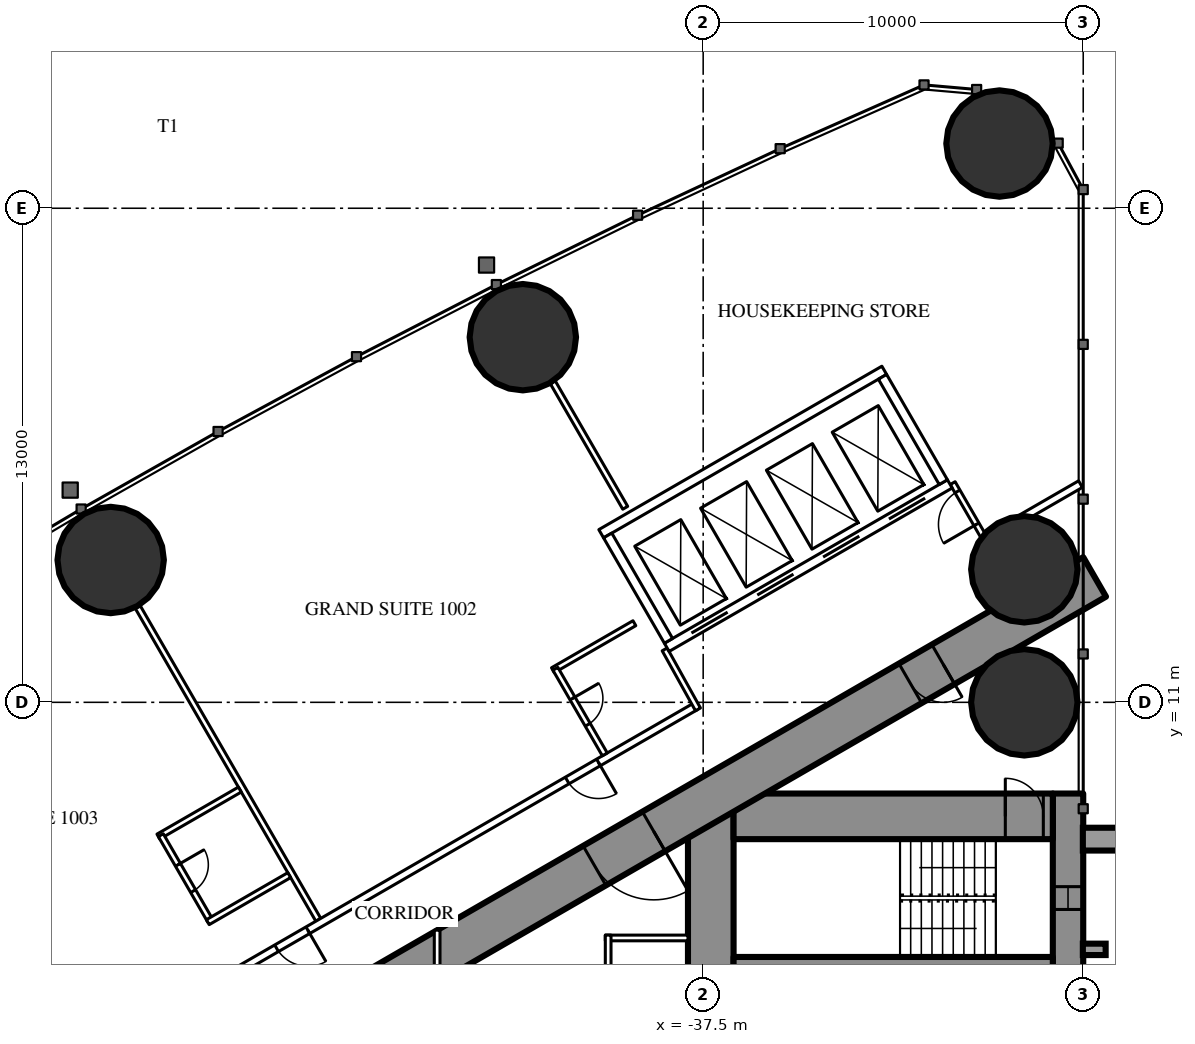
"""IFC4 building model, lengths in metres.
Left out: names, types, materials, properties, quantities, classifications, styles, units other than length and angle.
Written with IfcOpenShell. Run it as: python <this file> out.ifc"""

import sys

from ifc_helpers import new_model, si_unit, direction, frame, frame_2d, origin, origin_2d, place, context, subcontext, project, spatial, rectangle, hollow_circle, extrude, element, fill, save


model = new_model("IFC4")
c1 = context("Model", 3, precision=1e-05, world=origin(), true_north=direction((0.0, 1.0)))
c2 = subcontext(c1, "Body", "Model", "MODEL_VIEW")
j1 = project(units=[si_unit("LENGTHUNIT", "METRE"), si_unit("PLANEANGLEUNIT", "RADIAN")], contexts=[c1])
p1 = place(None, origin())
s1 = spatial("IfcSite", under=j1, at=p1, CompositionType="ELEMENT")
p2 = place(p1, origin())
s2 = spatial("IfcBuilding", under=s1, at=p2, CompositionType="ELEMENT")
p3 = place(p2, frame((0.0, 0.0, 42.5)))
s3 = spatial("IfcBuildingStorey", under=s2, at=p3, CompositionType="ELEMENT", Elevation=42.5)
for number, where, z_axis, x_axis in (
    (1, (-29.703, 25.703, 0.0), (0.0, 0.0, 1.0), (1.0, 0.0, 0.0)),
    (2, (-29.05, 11.0, 0.0), (0.0, 0.0, 1.0), (1.0, 0.0, 0.0)),
    (3, (-29.05, 14.5, 0.0), (0.0, 0.0, 1.0), (1.0, 0.0, 0.0)),
    (4, (-42.245, 20.607, 0.0), (0.0, 0.0, 1.0), (1.0, 0.0, 0.0)),
    (5, (-53.09, 14.745, 0.0), (0.0, 0.0, 1.0), (1.0, 0.0, 0.0)),
):
    element("IfcColumn", number, at=place(p3, frame(where, z_axis=z_axis, x_axis=x_axis)), inside=s3, PredefinedType="COLUMN", context=c2, shape_type="SweptSolid", body=[
        extrude(hollow_circle(Radius=1.4, WallThickness=0.12, at=origin_2d()), origin(), (0.0, 0.0, 1.0), 3.5),
    ])
p4 = place(p3, frame((-27.9, 8.6, 0.0), z_axis=(0.0, 0.0, 1.0), x_axis=(0.0, -1.0, 0.0)))
e6 = element("IfcWall", 6, at=p4, inside=s3, PredefinedType="SHEAR", context=c2, shape_type="SweptSolid", body=[
    extrude(rectangle(XDim=17.2, YDim=0.8, at=frame_2d((8.6, 0.0))), origin(), (0.0, 0.0, 1.0), 3.5),
])
p5 = place(p4, frame((2.45, 0.0, 0.6)))
e7 = element("IfcOpeningElement", 7, at=p5, cuts=e6, PredefinedType="OPENING", context=c2, shape_type="SweptSolid", body=[
    extrude(rectangle(XDim=0.6, YDim=2.1, at=frame_2d((0.3, 1.05))), frame((0.0, 0.41, 0.0), z_axis=(0.0, -1.0, 0.0), x_axis=(1.0, 0.0, 0.0)), (0.0, 0.0, 1.0), 0.82),
])
p6 = place(p4, frame((14.15, 0.0, 0.6)))
e8 = element("IfcOpeningElement", 8, at=p6, cuts=e6, PredefinedType="OPENING", context=c2, shape_type="SweptSolid", body=[
    extrude(rectangle(XDim=0.6, YDim=2.1, at=frame_2d((0.3, 1.05))), frame((0.0, 0.41, 0.0), z_axis=(0.0, -1.0, 0.0), x_axis=(1.0, 0.0, 0.0)), (0.0, 0.0, 1.0), 0.82),
])
p7 = place(p3, frame((-37.3, 8.6, 0.0), z_axis=(0.0, 0.0, 1.0), x_axis=(0.0, -1.0, 0.0)))
e9 = element("IfcWall", 9, at=p7, inside=s3, PredefinedType="SHEAR", context=c2, shape_type="SweptSolid", body=[
    extrude(rectangle(XDim=17.2, YDim=1.2, at=frame_2d((8.6, 0.0))), origin(), (0.0, 0.0, 1.0), 3.5),
])
p8 = place(p7, frame((7.7, 0.0, 0.0)))
e10 = element("IfcOpeningElement", 10, at=p8, cuts=e9, PredefinedType="OPENING", context=c2, shape_type="SweptSolid", body=[
    extrude(rectangle(XDim=1.8, YDim=2.2, at=frame_2d((0.9, 1.1))), frame((0.0, 0.61, 0.0), z_axis=(0.0, -1.0, 0.0), x_axis=(1.0, 0.0, 0.0)), (0.0, 0.0, 1.0), 1.22),
])
p9 = place(p3, frame((-28.3, 8.0, 0.0), z_axis=(0.0, 0.0, 1.0), x_axis=(-1.0, 0.0, 0.0)))
e11 = element("IfcWall", 11, at=p9, inside=s3, PredefinedType="SHEAR", context=c2, shape_type="SweptSolid", body=[
    extrude(rectangle(XDim=8.4, YDim=1.2, at=frame_2d((4.2, 0.0))), origin(), (0.0, 0.0, 1.0), 3.5),
])
p10 = place(p9, frame((0.25, 0.0, 0.0)))
e12 = element("IfcOpeningElement", 12, at=p10, cuts=e11, PredefinedType="OPENING", context=c2, shape_type="SweptSolid", body=[
    extrude(rectangle(XDim=1.0, YDim=2.2, at=frame_2d((0.5, 1.1))), frame((0.0, 0.61, 0.0), z_axis=(0.0, -1.0, 0.0), x_axis=(1.0, 0.0, 0.0)), (0.0, 0.0, 1.0), 1.22),
])
p11 = place(p3, frame((-28.3, 4.15, 0.0), z_axis=(0.0, 0.0, 1.0), x_axis=(-1.0, 0.0, 0.0)))
e13 = element("IfcWall", 13, at=p11, inside=s3, PredefinedType="SHEAR", context=c2, shape_type="SweptSolid", body=[
    extrude(rectangle(XDim=8.4, YDim=0.3, at=frame_2d((4.2, 0.0))), origin(), (0.0, 0.0, 1.0), 3.5),
])
p12 = place(p3, frame((-27.2, 14.3, 0.0), z_axis=(0.0, 0.0, 1.0), x_axis=(-0.866026593062, -0.499997940104, 0.0)))
e14 = element("IfcWall", 14, at=p12, inside=s3, PredefinedType="SHEAR", context=c2, shape_type="SweptSolid", body=[
    extrude(rectangle(XDim=28.946, YDim=1.2, at=frame_2d((14.473, 0.0))), origin(), (0.0, 0.0, 1.0), 3.5),
])
p13 = place(p12, frame((4.6, 0.0, 0.0)))
e15 = element("IfcOpeningElement", 15, at=p13, cuts=e14, PredefinedType="OPENING", context=c2, shape_type="SweptSolid", body=[
    extrude(rectangle(XDim=1.0, YDim=2.2, at=frame_2d((0.5, 1.1))), frame((0.0, 0.61, 0.0), z_axis=(0.0, -1.0, 0.0), x_axis=(1.0, 0.0, 0.0)), (0.0, 0.0, 1.0), 1.22),
])
p14 = place(p12, frame((13.395, 0.0, 0.0)))
e16 = element("IfcOpeningElement", 16, at=p14, cuts=e14, PredefinedType="OPENING", context=c2, shape_type="SweptSolid", body=[
    extrude(rectangle(XDim=1.8, YDim=2.2, at=frame_2d((0.9, 1.1))), frame((0.0, 0.61, 0.0), z_axis=(0.0, -1.0, 0.0), x_axis=(1.0, 0.0, 0.0)), (0.0, 0.0, 1.0), 1.22),
])
p15 = place(p3, frame((-47.627, 5.278, 0.0), z_axis=(0.0, 0.0, 1.0), x_axis=(-0.500009844318, 0.86601972009, 0.0)))
e17 = element("IfcWall", 17, at=p15, inside=s3, PredefinedType="PARTITIONING", context=c2, shape_type="SweptSolid", body=[
    extrude(rectangle(XDim=9.51, YDim=0.15, at=frame_2d((4.755, 0.0))), origin(), (0.0, 0.0, 1.0), 2.25),
])
p16 = place(p3, frame((-39.551, 16.119, 0.0), z_axis=(0.0, 0.0, 1.0), x_axis=(-0.500014214979, 0.866017196607, 0.0)))
e18 = element("IfcWall", 18, at=p16, inside=s3, PredefinedType="PARTITIONING", context=c2, shape_type="SweptSolid", body=[
    extrude(rectangle(XDim=3.815, YDim=0.15, at=frame_2d((1.907, 0.0))), origin(), (0.0, 0.0, 1.0), 3.25),
])
p17 = place(p3, frame((-27.572, 16.741, 0.0), z_axis=(0.0, 0.0, 1.0), x_axis=(-0.866034618596, -0.499984039138, 0.0)))
e19 = element("IfcWall", 19, at=p17, inside=s3, PredefinedType="PARTITIONING", context=c2, shape_type="SweptSolid", body=[
    extrude(rectangle(XDim=2.854, YDim=0.2, at=frame_2d((1.427, 0.0))), origin(), (0.0, 0.0, 1.0), 3.25),
])
p18 = place(p3, frame((-37.7, 10.894, 0.0), z_axis=(0.0, 0.0, 1.0), x_axis=(-0.866027905338, -0.499995667157, 0.0)))
e20 = element("IfcWall", 20, at=p18, inside=s3, PredefinedType="PARTITIONING", context=c2, shape_type="SweptSolid", body=[
    extrude(rectangle(XDim=21.787, YDim=0.2, at=frame_2d((10.894, 0.0))), origin(), (0.0, 0.0, 1.0), 3.25),
])
p19 = place(p18, frame((11.78, 0.0, 0.0)))
e21 = element("IfcOpeningElement", 21, at=p19, cuts=e20, PredefinedType="OPENING", context=c2, shape_type="SweptSolid", body=[
    extrude(rectangle(XDim=0.95, YDim=2.2, at=frame_2d((0.475, 1.1))), frame((0.0, 0.11, 0.0), z_axis=(0.0, -1.0, 0.0), x_axis=(1.0, 0.0, 0.0)), (0.0, 0.0, 1.0), 0.22),
])
p20 = place(p18, frame((2.95, 0.0, 0.0)))
e22 = element("IfcOpeningElement", 22, at=p20, cuts=e20, PredefinedType="OPENING", context=c2, shape_type="SweptSolid", body=[
    extrude(rectangle(XDim=0.95, YDim=2.2, at=frame_2d((0.475, 1.1))), frame((0.0, 0.11, 0.0), z_axis=(0.0, -1.0, 0.0), x_axis=(1.0, 0.0, 0.0)), (0.0, 0.0, 1.0), 0.22),
])
p21 = place(p3, frame((-38.513, 12.392, 0.0), z_axis=(0.0, 0.0, 1.0), x_axis=(0.485585508183, -0.874189175317, 0.0)))
e23 = element("IfcWall", 23, at=p21, inside=s3, PredefinedType="PARTITIONING", context=c2, shape_type="SweptSolid", body=[
    extrude(rectangle(XDim=1.805, YDim=0.15, at=frame_2d((0.902, 0.0))), origin(), (0.0, 0.0, 1.0), 3.25),
])
p22 = place(p3, frame((-30.033, 15.205, 0.0), z_axis=(0.0, 0.0, 1.0), x_axis=(-0.499980071345, 0.866036909293, 0.0)))
e24 = element("IfcWall", 24, at=p22, inside=s3, PredefinedType="PARTITIONING", context=c2, shape_type="SweptSolid", body=[
    extrude(rectangle(XDim=1.805, YDim=0.15, at=frame_2d((0.902, 0.0))), origin(), (0.0, 0.0, 1.0), 3.25),
])
p23 = place(p22, frame((0.552, 0.0, 0.0)))
e25 = element("IfcOpeningElement", 25, at=p23, cuts=e24, PredefinedType="OPENING", context=c2, shape_type="SweptSolid", body=[
    extrude(rectangle(XDim=1.0, YDim=2.2, at=frame_2d((0.5, 1.1))), frame((0.0, 0.085, 0.0), z_axis=(0.0, -1.0, 0.0), x_axis=(1.0, 0.0, 0.0)), (0.0, 0.0, 1.0), 0.17),
])
p24 = place(p3, frame((-49.692, 8.704, 0.0), z_axis=(0.0, 0.0, 1.0), x_axis=(-0.866073894602, -0.499916002032, 0.0)))
e26 = element("IfcWall", 26, at=p24, inside=s3, PredefinedType="PARTITIONING", context=c2, shape_type="SweptSolid", body=[
    extrude(rectangle(XDim=2.475, YDim=0.15, at=frame_2d((1.238, 0.0))), origin(), (0.0, 0.0, 1.0), 3.25),
])
p25 = place(p3, frame((-50.47, 5.253, 0.0), z_axis=(0.0, 0.0, 1.0), x_axis=(-0.500006934395, 0.866021400173, 0.0)))
e27 = element("IfcWall", 27, at=p25, inside=s3, PredefinedType="PARTITIONING", context=c2, shape_type="SweptSolid", body=[
    extrude(rectangle(XDim=2.6, YDim=0.15, at=frame_2d((1.3, 0.0))), origin(), (0.0, 0.0, 1.0), 3.25),
])
p26 = place(p25, frame((0.9, 0.0, 0.0)))
e28 = element("IfcOpeningElement", 28, at=p26, cuts=e27, PredefinedType="OPENING", context=c2, shape_type="SweptSolid", body=[
    extrude(rectangle(XDim=0.8, YDim=2.2, at=frame_2d((0.4, 1.1))), frame((0.0, 0.085, 0.0), z_axis=(0.0, -1.0, 0.0), x_axis=(1.0, 0.0, 0.0)), (0.0, 0.0, 1.0), 0.17),
])
p27 = place(p3, frame((-48.392, 6.453, 0.0), z_axis=(0.0, 0.0, 1.0), x_axis=(-0.86604923931, -0.499958713387, 0.0)))
e29 = element("IfcWall", 29, at=p27, inside=s3, PredefinedType="PARTITIONING", context=c2, shape_type="SweptSolid", body=[
    extrude(rectangle(XDim=2.475, YDim=0.15, at=frame_2d((1.237, 0.0))), origin(), (0.0, 0.0, 1.0), 3.25),
])
p28 = place(p3, frame((-39.31, 13.082, 0.0), z_axis=(0.0, 0.0, 1.0), x_axis=(-0.866031185235, -0.4999899861, 0.0)))
e30 = element("IfcWall", 30, at=p28, inside=s3, PredefinedType="PARTITIONING", context=c2, shape_type="SweptSolid", body=[
    extrude(rectangle(XDim=2.475, YDim=0.15, at=frame_2d((1.238, 0.0))), origin(), (0.0, 0.0, 1.0), 3.25),
])
p29 = place(p3, frame((-40.088, 9.63, 0.0), z_axis=(0.0, 0.0, 1.0), x_axis=(-0.500006934395, 0.866021400173, 0.0)))
e31 = element("IfcWall", 31, at=p29, inside=s3, PredefinedType="PARTITIONING", context=c2, shape_type="SweptSolid", body=[
    extrude(rectangle(XDim=2.6, YDim=0.15, at=frame_2d((1.3, 0.0))), origin(), (0.0, 0.0, 1.0), 3.25),
])
p30 = place(p29, frame((0.9, 0.0, 0.0)))
e32 = element("IfcOpeningElement", 32, at=p30, cuts=e31, PredefinedType="OPENING", context=c2, shape_type="SweptSolid", body=[
    extrude(rectangle(XDim=0.8, YDim=2.2, at=frame_2d((0.4, 1.1))), frame((0.0, 0.085, 0.0), z_axis=(0.0, -1.0, 0.0), x_axis=(1.0, 0.0, 0.0)), (0.0, 0.0, 1.0), 0.17),
])
p31 = place(p3, frame((-37.9, 4.8, 0.0), z_axis=(0.0, 0.0, 1.0), x_axis=(-1.0, 0.0, 0.0)))
e33 = element("IfcWall", 33, at=p31, inside=s3, PredefinedType="PARTITIONING", context=c2, shape_type="SweptSolid", body=[
    extrude(rectangle(XDim=2.175, YDim=0.15, at=frame_2d((1.087, 0.0))), origin(), (0.0, 0.0, 1.0), 3.25),
])
p32 = place(p3, frame((-40.0, 4.875, 0.0), z_axis=(0.0, 0.0, 1.0), x_axis=(0.0, -1.0, 0.0)))
e34 = element("IfcWall", 34, at=p32, inside=s3, PredefinedType="PARTITIONING", context=c2, shape_type="SweptSolid", body=[
    extrude(rectangle(XDim=3.75, YDim=0.15, at=frame_2d((1.875, 0.0))), origin(), (0.0, 0.0, 1.0), 3.25),
])
p33 = place(p32, frame((1.375, 0.0, 0.0)))
e35 = element("IfcOpeningElement", 35, at=p33, cuts=e34, PredefinedType="OPENING", context=c2, shape_type="SweptSolid", body=[
    extrude(rectangle(XDim=1.0, YDim=2.2, at=frame_2d((0.5, 1.1))), frame((0.0, 0.085, 0.0), z_axis=(0.0, -1.0, 0.0), x_axis=(1.0, 0.0, 0.0)), (0.0, 0.0, 1.0), 0.17),
])
p34 = place(p3, frame((-44.5, 5.005, 0.0), z_axis=(0.0, 0.0, 1.0), x_axis=(0.0, -1.0, 0.0)))
e36 = element("IfcWall", 36, at=p34, inside=s3, PredefinedType="PARTITIONING", context=c2, shape_type="SweptSolid", body=[
    extrude(rectangle(XDim=10.009, YDim=0.15, at=frame_2d((5.005, 0.0))), origin(), (0.0, 0.0, 1.0), 2.45),
])
p35 = place(p34, frame((4.505, 0.0, 0.0)))
e37 = element("IfcOpeningElement", 37, at=p35, cuts=e36, PredefinedType="OPENING", context=c2, shape_type="SweptSolid", body=[
    extrude(rectangle(XDim=1.0, YDim=2.2, at=frame_2d((0.5, 1.1))), frame((0.0, 0.085, 0.0), z_axis=(0.0, -1.0, 0.0), x_axis=(1.0, 0.0, 0.0)), (0.0, 0.0, 1.0), 0.17),
])
p36 = place(p3, frame((-31.01, 16.747, 0.0), z_axis=(0.0, 0.0, 1.0), x_axis=(-0.866028165386, -0.499995216735, 0.0)))
e38 = element("IfcWall", 38, at=p36, inside=s3, PredefinedType="PARTITIONING", context=c2, shape_type="SweptSolid", body=[
    extrude(rectangle(XDim=8.6, YDim=0.25, at=frame_2d((4.3, 0.0))), origin(), (0.0, 0.0, 1.0), 3.25),
])
p37 = place(p36, frame((0.75, 0.0, 0.0)))
e39 = element("IfcOpeningElement", 39, at=p37, cuts=e38, PredefinedType="OPENING", context=c2, shape_type="SweptSolid", body=[
    extrude(rectangle(XDim=1.1, YDim=2.2, at=frame_2d((0.55, 1.1))), frame((0.0, 0.135, 0.0), z_axis=(0.0, -1.0, 0.0), x_axis=(1.0, 0.0, 0.0)), (0.0, 0.0, 1.0), 0.27),
])
p38 = place(p36, frame((2.75, 0.0, 0.0)))
e40 = element("IfcOpeningElement", 40, at=p38, cuts=e38, PredefinedType="OPENING", context=c2, shape_type="SweptSolid", body=[
    extrude(rectangle(XDim=1.1, YDim=2.2, at=frame_2d((0.55, 1.1))), frame((0.0, 0.135, 0.0), z_axis=(0.0, -1.0, 0.0), x_axis=(1.0, 0.0, 0.0)), (0.0, 0.0, 1.0), 0.27),
])
p39 = place(p36, frame((4.75, 0.0, 0.0)))
e41 = element("IfcOpeningElement", 41, at=p39, cuts=e38, PredefinedType="OPENING", context=c2, shape_type="SweptSolid", body=[
    extrude(rectangle(XDim=1.1, YDim=2.2, at=frame_2d((0.55, 1.1))), frame((0.0, 0.135, 0.0), z_axis=(0.0, -1.0, 0.0), x_axis=(1.0, 0.0, 0.0)), (0.0, 0.0, 1.0), 0.27),
])
p40 = place(p36, frame((6.75, 0.0, 0.0)))
e42 = element("IfcOpeningElement", 42, at=p40, cuts=e38, PredefinedType="OPENING", context=c2, shape_type="SweptSolid", body=[
    extrude(rectangle(XDim=1.1, YDim=2.2, at=frame_2d((0.55, 1.1))), frame((0.0, 0.135, 0.0), z_axis=(0.0, -1.0, 0.0), x_axis=(1.0, 0.0, 0.0)), (0.0, 0.0, 1.0), 0.27),
])
p41 = place(p3, frame((-32.736, 19.736, 0.0), z_axis=(0.0, 0.0, 1.0), x_axis=(-0.866028165386, -0.499995216735, 0.0)))
e43 = element("IfcWall", 43, at=p41, inside=s3, PredefinedType="PARTITIONING", context=c2, shape_type="SweptSolid", body=[
    extrude(rectangle(XDim=8.6, YDim=0.25, at=frame_2d((4.3, 0.0))), origin(), (0.0, 0.0, 1.0), 3.25),
])
p42 = place(p3, frame((-31.181, 16.793, 0.0), z_axis=(0.0, 0.0, 1.0), x_axis=(-0.499929347863, 0.866066190972, 0.0)))
e44 = element("IfcWall", 44, at=p42, inside=s3, PredefinedType="PARTITIONING", context=c2, shape_type="SweptSolid", body=[
    extrude(rectangle(XDim=3.201, YDim=0.25, at=frame_2d((1.6, 0.0))), origin(), (0.0, 0.0, 1.0), 3.25),
])
p43 = place(p3, frame((-38.413, 12.618, 0.0), z_axis=(0.0, 0.0, 1.0), x_axis=(-0.499872130319, 0.866099216793, 0.0)))
e45 = element("IfcWall", 45, at=p43, inside=s3, PredefinedType="PARTITIONING", context=c2, shape_type="SweptSolid", body=[
    extrude(rectangle(XDim=3.2, YDim=0.25, at=frame_2d((1.6, 0.0))), origin(), (0.0, 0.0, 1.0), 3.25),
])
p44 = place(p26, origin())
e46 = element("IfcDoor", 46, at=p44, inside=s3, OperationType="SINGLE_SWING_RIGHT", PredefinedType="DOOR", context=c2, shape_type="SweptSolid", body=[
    extrude(rectangle(XDim=0.8, YDim=2.2, at=frame_2d((0.4, 1.1))), frame((0.0, 0.025, 0.0), z_axis=(0.0, -1.0, 0.0), x_axis=(1.0, 0.0, 0.0)), (0.0, 0.0, 1.0), 0.05),
])
fill(e28, e46)
p45 = place(p19, origin())
e47 = element("IfcDoor", 47, at=p45, inside=s3, OperationType="SINGLE_SWING_LEFT", PredefinedType="DOOR", context=c2, shape_type="SweptSolid", body=[
    extrude(rectangle(XDim=0.95, YDim=2.2, at=frame_2d((0.475, 1.1))), frame((0.0, 0.025, 0.0), z_axis=(0.0, -1.0, 0.0), x_axis=(1.0, 0.0, 0.0)), (0.0, 0.0, 1.0), 0.05),
])
fill(e21, e47)
p46 = place(p30, origin())
e48 = element("IfcDoor", 48, at=p46, inside=s3, OperationType="SINGLE_SWING_RIGHT", PredefinedType="DOOR", context=c2, shape_type="SweptSolid", body=[
    extrude(rectangle(XDim=0.8, YDim=2.2, at=frame_2d((0.4, 1.1))), frame((0.0, 0.025, 0.0), z_axis=(0.0, -1.0, 0.0), x_axis=(1.0, 0.0, 0.0)), (0.0, 0.0, 1.0), 0.05),
])
fill(e32, e48)
p47 = place(p20, origin())
e49 = element("IfcDoor", 49, at=p47, inside=s3, OperationType="SINGLE_SWING_LEFT", PredefinedType="DOOR", context=c2, shape_type="SweptSolid", body=[
    extrude(rectangle(XDim=0.95, YDim=2.2, at=frame_2d((0.475, 1.1))), frame((0.0, 0.025, 0.0), z_axis=(0.0, -1.0, 0.0), x_axis=(1.0, 0.0, 0.0)), (0.0, 0.0, 1.0), 0.05),
])
fill(e22, e49)
p48 = place(p23, origin())
e50 = element("IfcDoor", 50, at=p48, inside=s3, OperationType="SINGLE_SWING_LEFT", PredefinedType="DOOR", context=c2, shape_type="SweptSolid", body=[
    extrude(rectangle(XDim=1.0, YDim=2.2, at=frame_2d((0.5, 1.1))), frame((0.0, 0.025, 0.0), z_axis=(0.0, -1.0, 0.0), x_axis=(1.0, 0.0, 0.0)), (0.0, 0.0, 1.0), 0.05),
])
fill(e25, e50)
p49 = place(p13, origin())
e51 = element("IfcDoor", 51, at=p49, inside=s3, OperationType="SINGLE_SWING_LEFT", PredefinedType="DOOR", context=c2, shape_type="SweptSolid", body=[
    extrude(rectangle(XDim=1.0, YDim=2.2, at=frame_2d((0.5, 1.1))), frame((0.0, 0.025, 0.0), z_axis=(0.0, -1.0, 0.0), x_axis=(1.0, 0.0, 0.0)), (0.0, 0.0, 1.0), 0.05),
])
fill(e15, e51)
p50 = place(p14, origin())
e52 = element("IfcDoor", 52, at=p50, inside=s3, OperationType="DOUBLE_DOOR_SINGLE_SWING", PredefinedType="DOOR", context=c2, shape_type="SweptSolid", body=[
    extrude(rectangle(XDim=1.8, YDim=2.2, at=frame_2d((0.9, 1.1))), frame((0.0, 0.025, 0.0), z_axis=(0.0, -1.0, 0.0), x_axis=(1.0, 0.0, 0.0)), (0.0, 0.0, 1.0), 0.05),
])
fill(e16, e52)
p51 = place(p10, origin())
e53 = element("IfcDoor", 53, at=p51, inside=s3, OperationType="SINGLE_SWING_RIGHT", PredefinedType="DOOR", context=c2, shape_type="SweptSolid", body=[
    extrude(rectangle(XDim=1.0, YDim=2.2, at=frame_2d((0.5, 1.1))), frame((0.0, 0.025, 0.0), z_axis=(0.0, -1.0, 0.0), x_axis=(1.0, 0.0, 0.0)), (0.0, 0.0, 1.0), 0.05),
])
fill(e12, e53)
p52 = place(p37, origin())
e54 = element("IfcDoor", 54, at=p52, inside=s3, OperationType="DOUBLE_DOOR_SLIDING", PredefinedType="USERDEFINED", context=c2, shape_type="SweptSolid", body=[
    extrude(rectangle(XDim=1.1, YDim=2.2, at=frame_2d((0.55, 1.1))), frame((0.0, 0.025, 0.0), z_axis=(0.0, -1.0, 0.0), x_axis=(1.0, 0.0, 0.0)), (0.0, 0.0, 1.0), 0.05),
])
fill(e39, e54)
p53 = place(p38, origin())
e55 = element("IfcDoor", 55, at=p53, inside=s3, OperationType="DOUBLE_DOOR_SLIDING", PredefinedType="USERDEFINED", context=c2, shape_type="SweptSolid", body=[
    extrude(rectangle(XDim=1.1, YDim=2.2, at=frame_2d((0.55, 1.1))), frame((0.0, 0.025, 0.0), z_axis=(0.0, -1.0, 0.0), x_axis=(1.0, 0.0, 0.0)), (0.0, 0.0, 1.0), 0.05),
])
fill(e40, e55)
p54 = place(p39, origin())
e56 = element("IfcDoor", 56, at=p54, inside=s3, OperationType="DOUBLE_DOOR_SLIDING", PredefinedType="USERDEFINED", context=c2, shape_type="SweptSolid", body=[
    extrude(rectangle(XDim=1.1, YDim=2.2, at=frame_2d((0.55, 1.1))), frame((0.0, 0.025, 0.0), z_axis=(0.0, -1.0, 0.0), x_axis=(1.0, 0.0, 0.0)), (0.0, 0.0, 1.0), 0.05),
])
fill(e41, e56)
p55 = place(p40, origin())
e57 = element("IfcDoor", 57, at=p55, inside=s3, OperationType="DOUBLE_DOOR_SLIDING", PredefinedType="USERDEFINED", context=c2, shape_type="SweptSolid", body=[
    extrude(rectangle(XDim=1.1, YDim=2.2, at=frame_2d((0.55, 1.1))), frame((0.0, 0.025, 0.0), z_axis=(0.0, -1.0, 0.0), x_axis=(1.0, 0.0, 0.0)), (0.0, 0.0, 1.0), 0.05),
])
fill(e42, e57)
p56 = place(p5, origin())
e58 = element("IfcWindow", 58, at=p56, inside=s3, PartitioningType="SINGLE_PANEL", PredefinedType="WINDOW", context=c2, shape_type="SweptSolid", body=[
    extrude(rectangle(XDim=0.6, YDim=2.1, at=frame_2d((0.3, 1.05))), frame((0.0, 0.03, 0.0), z_axis=(0.0, -1.0, 0.0), x_axis=(1.0, 0.0, 0.0)), (0.0, 0.0, 1.0), 0.06),
])
fill(e7, e58)
save(model, sys.argv[1])
